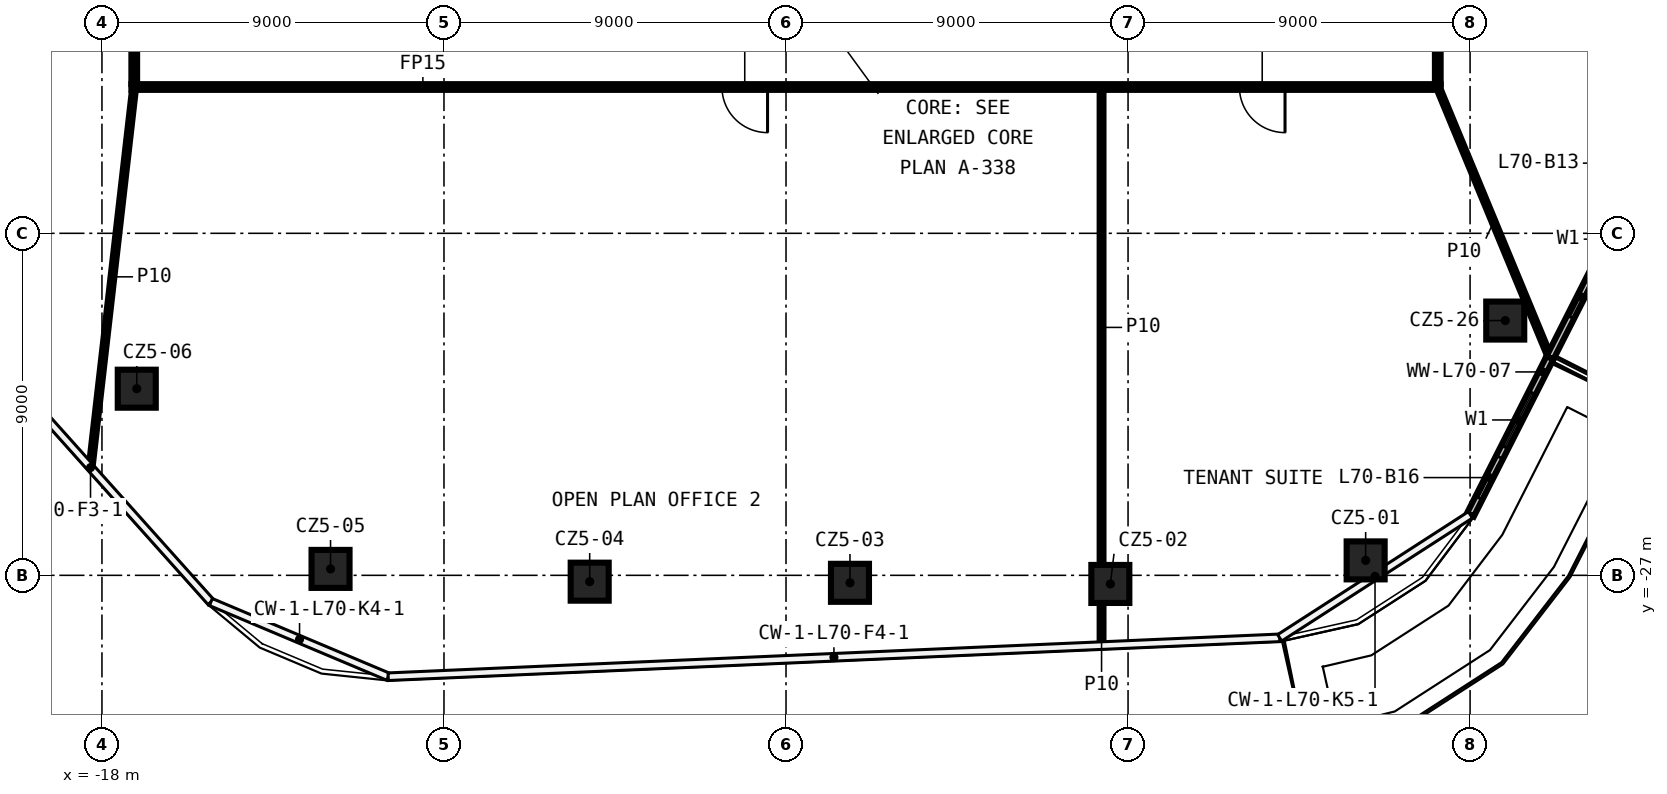
"""IFC4 building model, lengths in metres.
Left out: names, types, materials, properties, quantities, classifications, styles, units other than length and angle.
Written with IfcOpenShell. Run it as: python <this file> out.ifc"""

import sys

from ifc_helpers import new_model, si_unit, direction, frame, frame_2d, origin, origin_2d, place, context, subcontext, project, spatial, rectangle, extrude, element, fill, save


model = new_model("IFC4")
c1 = context("Model", 3, precision=1e-05, world=origin(), true_north=direction((0.0, 1.0)))
c2 = subcontext(c1, "Body", "Model", "MODEL_VIEW")
j1 = project(units=[si_unit("LENGTHUNIT", "METRE"), si_unit("PLANEANGLEUNIT", "RADIAN")], contexts=[c1])
p1 = place(None, origin())
s1 = spatial("IfcSite", under=j1, at=p1, CompositionType="ELEMENT")
p2 = place(p1, origin())
s2 = spatial("IfcBuilding", under=s1, at=p2, CompositionType="ELEMENT")
p3 = place(p2, frame((0.0, 0.0, 327.8)))
s3 = spatial("IfcBuildingStorey", under=s2, at=p3, CompositionType="ELEMENT", Elevation=327.8)
for number, where, z_axis, x_axis in (
    (1, (15.252, -26.607, 0.0), (0.0, 0.0, 1.0), (1.0, 0.0, 0.0)),
    (2, (8.534, -27.227, 0.0), (0.0, 0.0, 1.0), (1.0, 0.0, 0.0)),
    (3, (1.683, -27.197, 0.0), (0.0, 0.0, 1.0), (1.0, 0.0, 0.0)),
    (4, (-5.166, -27.167, 0.0), (0.0, 0.0, 1.0), (1.0, 0.0, 0.0)),
    (5, (-11.985, -26.831, 0.0), (0.0, 0.0, 1.0), (1.0, 0.0, 0.0)),
    (6, (-17.084, -22.089, 0.0), (0.0, 0.0, 1.0), (1.0, 0.0, 0.0)),
    (7, (18.925, -20.296, 0.0), (0.0, 0.0, 1.0), (1.0, 0.0, 0.0)),
):
    element("IfcColumn", number, at=place(p3, frame(where, z_axis=z_axis, x_axis=x_axis)), inside=s3, PredefinedType="COLUMN", context=c2, shape_type="SweptSolid", body=[
        extrude(rectangle(XDim=1.0, YDim=1.0, at=origin_2d()), origin(), (0.0, 0.0, 1.0), 3.82),
    ])
p4 = place(p3, frame((17.225, -14.15, 0.0), z_axis=(0.0, 0.0, 1.0), x_axis=(-1.0, 0.0, 0.0)))
e8 = element("IfcWall", 8, at=p4, inside=s3, PredefinedType="PARTITIONING", context=c2, shape_type="SweptSolid", body=[
    extrude(rectangle(XDim=34.45, YDim=0.15, at=frame_2d((17.225, 0.0))), origin(), (0.0, 0.0, 1.0), 3.82),
])
p5 = place(p4, frame((17.711, 0.0, 0.0)))
e9 = element("IfcOpeningElement", 9, at=p5, cuts=e8, PredefinedType="OPENING", context=c2, shape_type="SweptSolid", body=[
    extrude(rectangle(XDim=1.2, YDim=2.1, at=frame_2d((0.6, 1.05))), frame((0.0, 0.085, 0.0), z_axis=(0.0, -1.0, 0.0), x_axis=(1.0, 0.0, 0.0)), (0.0, 0.0, 1.0), 0.17),
])
p6 = place(p4, frame((4.094, 0.0, 0.0)))
e10 = element("IfcOpeningElement", 10, at=p6, cuts=e8, PredefinedType="OPENING", context=c2, shape_type="SweptSolid", body=[
    extrude(rectangle(XDim=1.2, YDim=2.1, at=frame_2d((0.6, 1.05))), frame((0.0, 0.085, 0.0), z_axis=(0.0, -1.0, 0.0), x_axis=(1.0, 0.0, 0.0)), (0.0, 0.0, 1.0), 0.17),
])
p7 = place(p3, frame((-18.296, -24.14, 0.0), z_axis=(0.0, 0.0, 1.0), x_axis=(0.11391359401, 0.993490660801, 0.0)))
e11 = element("IfcWall", 11, at=p7, inside=s3, PredefinedType="PARTITIONING", context=c2, shape_type="SweptSolid", body=[
    extrude(rectangle(XDim=10.056, YDim=0.1, at=frame_2d((5.028, 0.0))), origin(), (0.0, 0.0, 1.0), 3.82),
])
p8 = place(p3, frame((17.15, 14.075, 0.0), z_axis=(0.0, 0.0, 1.0), x_axis=(0.0, -1.0, 0.0)))
e12 = element("IfcWall", 12, at=p8, inside=s3, PredefinedType="PARTITIONING", context=c2, shape_type="SweptSolid", body=[
    extrude(rectangle(XDim=28.15, YDim=0.15, at=frame_2d((14.075, 0.0))), origin(), (0.0, 0.0, 1.0), 3.82),
])
p9 = place(p8, frame((18.186, 0.0, 0.0)))
e13 = element("IfcOpeningElement", 13, at=p9, cuts=e12, PredefinedType="OPENING", context=c2, shape_type="SweptSolid", body=[
    extrude(rectangle(XDim=1.2, YDim=2.1, at=frame_2d((0.6, 1.05))), frame((0.0, 0.085, 0.0), z_axis=(0.0, -1.0, 0.0), x_axis=(1.0, 0.0, 0.0)), (0.0, 0.0, 1.0), 0.17),
])
p10 = place(p3, frame((8.303, -28.83, 0.0), z_axis=(0.0, 0.0, 1.0), x_axis=(0.0, 1.0, 0.0)))
e14 = element("IfcWall", 14, at=p10, inside=s3, PredefinedType="PARTITIONING", context=c2, shape_type="SweptSolid", body=[
    extrude(rectangle(XDim=1.103, YDim=0.1, at=frame_2d((0.551, 0.0))), origin(), (0.0, 0.0, 1.0), 3.82),
])
p11 = place(p3, frame((8.303, -26.727, 0.0), z_axis=(0.0, 0.0, 1.0), x_axis=(0.0, 1.0, 0.0)))
e15 = element("IfcWall", 15, at=p11, inside=s3, PredefinedType="PARTITIONING", context=c2, shape_type="SweptSolid", body=[
    extrude(rectangle(XDim=12.502, YDim=0.1, at=frame_2d((6.251, 0.0))), origin(), (0.0, 0.0, 1.0), 3.82),
])
p12 = place(p3, frame((-17.15, -14.075, 0.0), z_axis=(0.0, 0.0, 1.0), x_axis=(0.0, 1.0, 0.0)))
e16 = element("IfcWall", 16, at=p12, inside=s3, PredefinedType="PARTITIONING", context=c2, shape_type="SweptSolid", body=[
    extrude(rectangle(XDim=28.15, YDim=0.15, at=frame_2d((14.075, 0.0))), origin(), (0.0, 0.0, 1.0), 3.82),
])
p13 = place(p12, frame((18.298, 0.0, 0.0)))
e17 = element("IfcOpeningElement", 17, at=p13, cuts=e16, PredefinedType="OPENING", context=c2, shape_type="SweptSolid", body=[
    extrude(rectangle(XDim=1.2, YDim=2.1, at=frame_2d((0.6, 1.05))), frame((0.0, 0.085, 0.0), z_axis=(0.0, -1.0, 0.0), x_axis=(1.0, 0.0, 0.0)), (0.0, 0.0, 1.0), 0.17),
])
p14 = place(p3, frame((17.15, -14.15, 0.0), z_axis=(0.0, 0.0, 1.0), x_axis=(0.382693080748, -0.923875535961, 0.0)))
e18 = element("IfcWall", 18, at=p14, inside=s3, PredefinedType="PARTITIONING", context=c2, shape_type="SweptSolid", body=[
    extrude(rectangle(XDim=7.687, YDim=0.1, at=frame_2d((3.843, 0.0))), origin(), (0.0, 0.0, 1.0), 3.82),
])
p15 = place(p3, frame((20.102, -21.276, 0.0), z_axis=(0.0, 0.0, 1.0), x_axis=(0.451966467013, 0.892034927957, 0.0)))
e19 = element("IfcWall", 19, at=p15, inside=s3, PredefinedType="SOLIDWALL", context=c2, shape_type="SweptSolid", body=[
    extrude(rectangle(XDim=18.57, YDim=0.2, at=frame_2d((9.285, 0.0))), origin(), (0.0, 0.0, 1.0), 3.82),
])
p16 = place(p15, frame((2.7, 0.0, 0.6)))
e20 = element("IfcOpeningElement", 20, at=p16, cuts=e19, PredefinedType="OPENING", context=c2, shape_type="SweptSolid", body=[
    extrude(rectangle(XDim=1.6, YDim=2.4, at=frame_2d((0.8, 1.2))), frame((0.0, 0.11, 0.0), z_axis=(0.0, -1.0, 0.0), x_axis=(1.0, 0.0, 0.0)), (0.0, 0.0, 1.0), 0.22),
])
p17 = place(p15, frame((1.2, 0.0, 0.0)))
e21 = element("IfcOpeningElement", 21, at=p17, cuts=e19, PredefinedType="OPENING", context=c2, shape_type="SweptSolid", body=[
    extrude(rectangle(XDim=1.2, YDim=2.4, at=frame_2d((0.6, 1.2))), frame((0.0, 0.11, 0.0), z_axis=(0.0, -1.0, 0.0), x_axis=(1.0, 0.0, 0.0)), (0.0, 0.0, 1.0), 0.22),
])
p18 = place(p15, frame((6.643, 0.0, 0.6)))
e22 = element("IfcOpeningElement", 22, at=p18, cuts=e19, PredefinedType="OPENING", context=c2, shape_type="SweptSolid", body=[
    extrude(rectangle(XDim=1.6, YDim=2.4, at=frame_2d((0.8, 1.2))), frame((0.0, 0.11, 0.0), z_axis=(0.0, -1.0, 0.0), x_axis=(1.0, 0.0, 0.0)), (0.0, 0.0, 1.0), 0.22),
])
p19 = place(p15, frame((5.143, 0.0, 0.0)))
e23 = element("IfcOpeningElement", 23, at=p19, cuts=e19, PredefinedType="OPENING", context=c2, shape_type="SweptSolid", body=[
    extrude(rectangle(XDim=1.2, YDim=2.4, at=frame_2d((0.6, 1.2))), frame((0.0, 0.11, 0.0), z_axis=(0.0, -1.0, 0.0), x_axis=(1.0, 0.0, 0.0)), (0.0, 0.0, 1.0), 0.22),
])
p20 = place(p15, frame((11.285, 0.0, 0.6)))
e24 = element("IfcOpeningElement", 24, at=p20, cuts=e19, PredefinedType="OPENING", context=c2, shape_type="SweptSolid", body=[
    extrude(rectangle(XDim=1.6, YDim=2.4, at=frame_2d((0.8, 1.2))), frame((0.0, 0.11, 0.0), z_axis=(0.0, -1.0, 0.0), x_axis=(1.0, 0.0, 0.0)), (0.0, 0.0, 1.0), 0.22),
])
p21 = place(p15, frame((9.785, 0.0, 0.0)))
e25 = element("IfcOpeningElement", 25, at=p21, cuts=e19, PredefinedType="OPENING", context=c2, shape_type="SweptSolid", body=[
    extrude(rectangle(XDim=1.2, YDim=2.4, at=frame_2d((0.6, 1.2))), frame((0.0, 0.11, 0.0), z_axis=(0.0, -1.0, 0.0), x_axis=(1.0, 0.0, 0.0)), (0.0, 0.0, 1.0), 0.22),
])
p22 = place(p15, frame((16.627, 0.0, 0.6)))
e26 = element("IfcOpeningElement", 26, at=p22, cuts=e19, PredefinedType="OPENING", context=c2, shape_type="SweptSolid", body=[
    extrude(rectangle(XDim=1.6, YDim=2.4, at=frame_2d((0.8, 1.2))), frame((0.0, 0.11, 0.0), z_axis=(0.0, -1.0, 0.0), x_axis=(1.0, 0.0, 0.0)), (0.0, 0.0, 1.0), 0.22),
])
p23 = place(p15, frame((15.127, 0.0, 0.0)))
e27 = element("IfcOpeningElement", 27, at=p23, cuts=e19, PredefinedType="OPENING", context=c2, shape_type="SweptSolid", body=[
    extrude(rectangle(XDim=1.2, YDim=2.4, at=frame_2d((0.6, 1.2))), frame((0.0, 0.11, 0.0), z_axis=(0.0, -1.0, 0.0), x_axis=(1.0, 0.0, 0.0)), (0.0, 0.0, 1.0), 0.22),
])
p24 = place(p3, frame((18.008, -25.409, 0.0), z_axis=(0.0, 0.0, 1.0), x_axis=(0.451970383378, 0.892032943646, 0.0)))
e28 = element("IfcWall", 28, at=p24, inside=s3, PredefinedType="SOLIDWALL", context=c2, shape_type="SweptSolid", body=[
    extrude(rectangle(XDim=4.634, YDim=0.2, at=frame_2d((2.317, 0.0))), origin(), (0.0, 0.0, 1.0), 3.82),
])
p25 = place(p24, frame((2.0, 0.0, 0.6)))
e29 = element("IfcOpeningElement", 29, at=p25, cuts=e28, PredefinedType="OPENING", context=c2, shape_type="SweptSolid", body=[
    extrude(rectangle(XDim=1.6, YDim=2.4, at=frame_2d((0.8, 1.2))), frame((0.0, 0.11, 0.0), z_axis=(0.0, -1.0, 0.0), x_axis=(1.0, 0.0, 0.0)), (0.0, 0.0, 1.0), 0.22),
])
p26 = place(p24, frame((0.5, 0.0, 0.0)))
e30 = element("IfcOpeningElement", 30, at=p26, cuts=e28, PredefinedType="OPENING", context=c2, shape_type="SweptSolid", body=[
    extrude(rectangle(XDim=1.2, YDim=2.4, at=frame_2d((0.6, 1.2))), frame((0.0, 0.11, 0.0), z_axis=(0.0, -1.0, 0.0), x_axis=(1.0, 0.0, 0.0)), (0.0, 0.0, 1.0), 0.22),
])
p27 = place(p5, origin())
e31 = element("IfcDoor", 31, at=p27, inside=s3, OperationType="SINGLE_SWING_LEFT", PredefinedType="DOOR", context=c2, shape_type="SweptSolid", body=[
    extrude(rectangle(XDim=1.2, YDim=2.1, at=frame_2d((0.6, 1.05))), frame((0.0, 0.025, 0.0), z_axis=(0.0, -1.0, 0.0), x_axis=(1.0, 0.0, 0.0)), (0.0, 0.0, 1.0), 0.05),
])
fill(e9, e31)
p28 = place(p6, origin())
e32 = element("IfcDoor", 32, at=p28, inside=s3, OperationType="SINGLE_SWING_RIGHT", PredefinedType="DOOR", context=c2, shape_type="SweptSolid", body=[
    extrude(rectangle(XDim=1.2, YDim=2.1, at=frame_2d((0.6, 1.05))), frame((0.0, 0.025, 0.0), z_axis=(0.0, -1.0, 0.0), x_axis=(1.0, 0.0, 0.0)), (0.0, 0.0, 1.0), 0.05),
])
fill(e10, e32)
p29 = place(p17, origin())
e33 = element("IfcDoor", 33, at=p29, inside=s3, OperationType="SLIDING_TO_LEFT", PredefinedType="DOOR", context=c2, shape_type="SweptSolid", body=[
    extrude(rectangle(XDim=1.2, YDim=2.4, at=frame_2d((0.6, 1.2))), frame((0.0, 0.025, 0.0), z_axis=(0.0, -1.0, 0.0), x_axis=(1.0, 0.0, 0.0)), (0.0, 0.0, 1.0), 0.05),
])
fill(e21, e33)
p30 = place(p25, origin())
e34 = element("IfcWindow", 34, at=p30, inside=s3, PartitioningType="SINGLE_PANEL", PredefinedType="WINDOW", context=c2, shape_type="SweptSolid", body=[
    extrude(rectangle(XDim=1.6, YDim=2.4, at=frame_2d((0.8, 1.2))), frame((0.0, 0.03, 0.0), z_axis=(0.0, -1.0, 0.0), x_axis=(1.0, 0.0, 0.0)), (0.0, 0.0, 1.0), 0.06),
])
fill(e29, e34)
p31 = place(p26, origin())
e35 = element("IfcDoor", 35, at=p31, inside=s3, OperationType="SLIDING_TO_LEFT", PredefinedType="DOOR", context=c2, shape_type="SweptSolid", body=[
    extrude(rectangle(XDim=1.2, YDim=2.4, at=frame_2d((0.6, 1.2))), frame((0.0, 0.025, 0.0), z_axis=(0.0, -1.0, 0.0), x_axis=(1.0, 0.0, 0.0)), (0.0, 0.0, 1.0), 0.05),
])
fill(e30, e35)
save(model, sys.argv[1])
